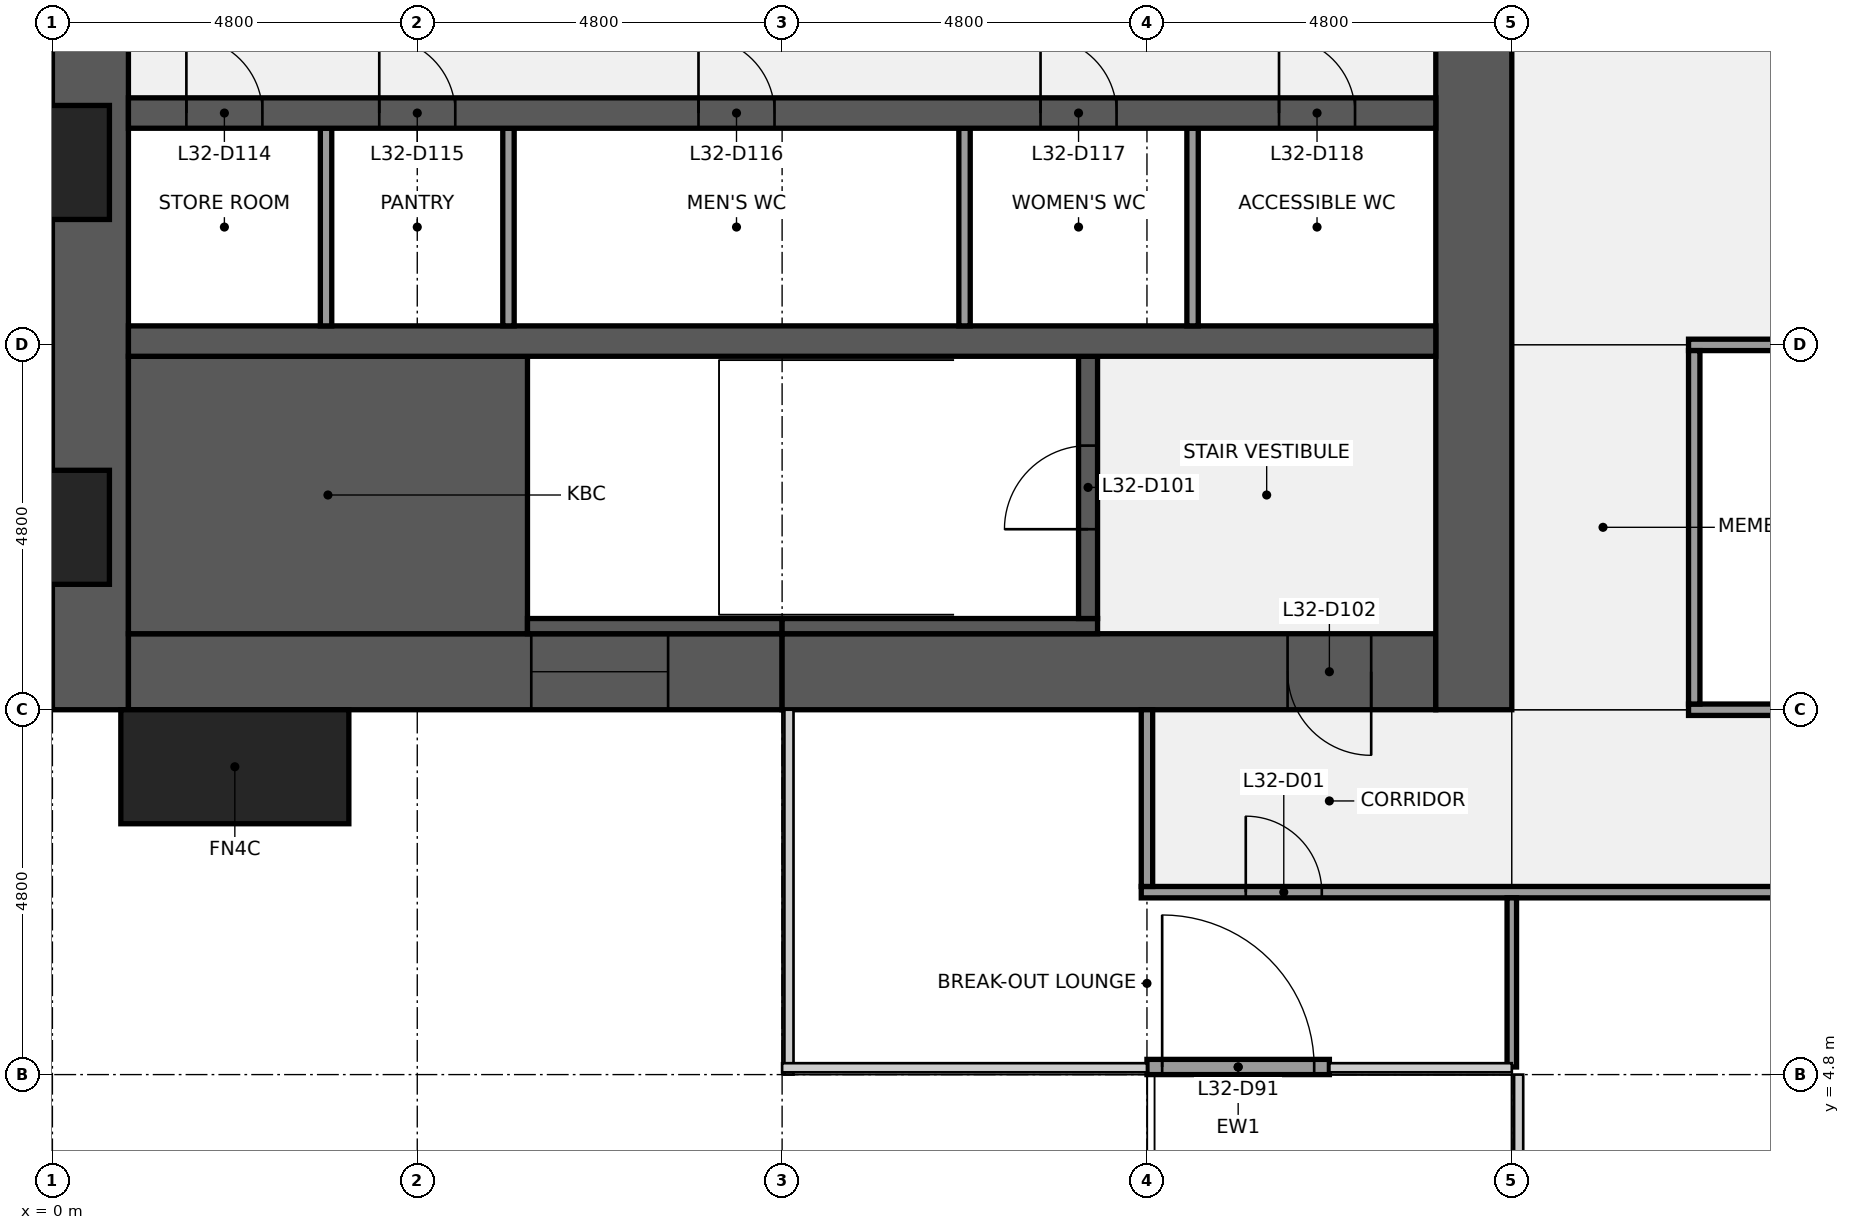
"""IFC4 building model, lengths in metres.
Left out: names, types, materials, properties, quantities, classifications, styles, units other than length and angle.
Written with IfcOpenShell. Run it as: python <this file> out.ifc"""

import sys

from ifc_helpers import new_model, si_unit, direction, frame, frame_2d, origin, origin_2d, place, context, subcontext, project, spatial, rectangle, extrude, element, fill, save


model = new_model("IFC4")
c1 = context("Model", 3, precision=1e-05, world=origin(), true_north=direction((0.0, 1.0)))
c2 = subcontext(c1, "Body", "Model", "MODEL_VIEW")
j1 = project(units=[si_unit("LENGTHUNIT", "METRE"), si_unit("PLANEANGLEUNIT", "RADIAN")], contexts=[c1])
p1 = place(None, origin())
s1 = spatial("IfcSite", under=j1, at=p1, CompositionType="ELEMENT")
p2 = place(p1, origin())
s2 = spatial("IfcBuilding", under=s1, at=p2, CompositionType="ELEMENT")
p3 = place(p2, frame((0.0, 0.0, 148.1)))
s3 = spatial("IfcBuildingStorey", under=s2, at=p3, CompositionType="ELEMENT", Elevation=148.1)
p4 = place(p3, frame((0.5, 9.6, 0.0), z_axis=(0.0, 0.0, 1.0), x_axis=(0.0, 1.0, 0.0)))
e1 = element("IfcWall", 1, at=p4, inside=s3, PredefinedType="SHEAR", context=c2, shape_type="SweptSolid", body=[
    extrude(rectangle(XDim=28.8, YDim=1.0, at=frame_2d((14.4, 0.0))), origin(), (0.0, 0.0, 1.0), 3.84),
])
p5 = place(p4, frame((8.85, 0.0, 0.9)))
e2 = element("IfcOpeningElement", 2, at=p5, cuts=e1, PredefinedType="OPENING", context=c2, shape_type="SweptSolid", body=[
    extrude(rectangle(XDim=1.5, YDim=1.5, at=frame_2d((0.75, 0.75))), frame((0.0, 0.51, 0.0), z_axis=(0.0, -1.0, 0.0), x_axis=(1.0, 0.0, 0.0)), (0.0, 0.0, 1.0), 1.02),
])
p6 = place(p4, frame((18.45, 0.0, 0.9)))
e3 = element("IfcOpeningElement", 3, at=p6, cuts=e1, PredefinedType="OPENING", context=c2, shape_type="SweptSolid", body=[
    extrude(rectangle(XDim=1.5, YDim=1.5, at=frame_2d((0.75, 0.75))), frame((0.0, 0.51, 0.0), z_axis=(0.0, -1.0, 0.0), x_axis=(1.0, 0.0, 0.0)), (0.0, 0.0, 1.0), 1.02),
])
p7 = place(p3, frame((9.6, 10.1, 0.0), z_axis=(0.0, 0.0, 1.0), x_axis=(-1.0, 0.0, 0.0)))
e4 = element("IfcWall", 4, at=p7, inside=s3, PredefinedType="SHEAR", context=c2, shape_type="SweptSolid", body=[
    extrude(rectangle(XDim=8.6, YDim=1.0, at=frame_2d((4.3, 0.0))), origin(), (0.0, 0.0, 1.0), 3.84),
])
p8 = place(p7, frame((1.5, 0.0, 0.9)))
e5 = element("IfcOpeningElement", 5, at=p8, cuts=e4, PredefinedType="OPENING", context=c2, shape_type="SweptSolid", body=[
    extrude(rectangle(XDim=1.8, YDim=1.5, at=frame_2d((0.9, 0.75))), frame((0.0, 0.51, 0.0), z_axis=(0.0, -1.0, 0.0), x_axis=(1.0, 0.0, 0.0)), (0.0, 0.0, 1.0), 1.02),
])
p9 = place(p3, frame((18.2, 10.1, 0.0), z_axis=(0.0, 0.0, 1.0), x_axis=(-1.0, 0.0, 0.0)))
e6 = element("IfcWall", 6, at=p9, inside=s3, PredefinedType="SHEAR", context=c2, shape_type="SweptSolid", body=[
    extrude(rectangle(XDim=8.6, YDim=1.0, at=frame_2d((4.3, 0.0))), origin(), (0.0, 0.0, 1.0), 3.84),
])
p10 = place(p9, frame((0.85, 0.0, 0.0)))
e7 = element("IfcOpeningElement", 7, at=p10, cuts=e6, PredefinedType="OPENING", context=c2, shape_type="SweptSolid", body=[
    extrude(rectangle(XDim=1.1, YDim=2.1, at=frame_2d((0.55, 1.05))), frame((0.0, 0.51, 0.0), z_axis=(0.0, -1.0, 0.0), x_axis=(1.0, 0.0, 0.0)), (0.0, 0.0, 1.0), 1.02),
])
p11 = place(p3, frame((18.7, 38.4, 0.0), z_axis=(0.0, 0.0, 1.0), x_axis=(0.0, -1.0, 0.0)))
e8 = element("IfcWall", 8, at=p11, inside=s3, PredefinedType="SHEAR", context=c2, shape_type="SweptSolid", body=[
    extrude(rectangle(XDim=28.8, YDim=1.0, at=frame_2d((14.4, 0.0))), origin(), (0.0, 0.0, 1.0), 3.84),
])
p12 = place(p11, frame((18.3, 0.0, 0.0)))
e9 = element("IfcOpeningElement", 9, at=p12, cuts=e8, PredefinedType="OPENING", context=c2, shape_type="SweptSolid", body=[
    extrude(rectangle(XDim=1.8, YDim=2.1, at=frame_2d((0.9, 1.05))), frame((0.0, 0.51, 0.0), z_axis=(0.0, -1.0, 0.0), x_axis=(1.0, 0.0, 0.0)), (0.0, 0.0, 1.0), 1.02),
])
p13 = place(p11, frame((8.7, 0.0, 0.0)))
e10 = element("IfcOpeningElement", 10, at=p13, cuts=e8, PredefinedType="OPENING", context=c2, shape_type="SweptSolid", body=[
    extrude(rectangle(XDim=1.8, YDim=2.1, at=frame_2d((0.9, 1.05))), frame((0.0, 0.51, 0.0), z_axis=(0.0, -1.0, 0.0), x_axis=(1.0, 0.0, 0.0)), (0.0, 0.0, 1.0), 1.02),
])
p14 = place(p3, frame((1.0, 12.425, 0.0), z_axis=(0.0, 0.0, 1.0), x_axis=(1.0, 0.0, 0.0)))
e11 = element("IfcWall", 11, at=p14, inside=s3, PredefinedType="SHEAR", context=c2, shape_type="SweptSolid", body=[
    extrude(rectangle(XDim=5.25, YDim=3.65, at=frame_2d((2.625, 0.0))), origin(), (0.0, 0.0, 1.0), 3.84),
])
p15 = place(p3, frame((6.25, 10.7, 0.0), z_axis=(0.0, 0.0, 1.0), x_axis=(1.0, 0.0, 0.0)))
e12 = element("IfcWall", 12, at=p15, inside=s3, PredefinedType="SHEAR", context=c2, shape_type="SweptSolid", body=[
    extrude(rectangle(XDim=3.35, YDim=0.2, at=frame_2d((1.675, 0.0))), origin(), (0.0, 0.0, 1.0), 3.84),
])
p16 = place(p3, frame((9.6, 10.7, 0.0), z_axis=(0.0, 0.0, 1.0), x_axis=(1.0, 0.0, 0.0)))
e13 = element("IfcWall", 13, at=p16, inside=s3, PredefinedType="SHEAR", context=c2, shape_type="SweptSolid", body=[
    extrude(rectangle(XDim=4.15, YDim=0.2, at=frame_2d((2.075, 0.0))), origin(), (0.0, 0.0, 1.0), 3.84),
])
p17 = place(p3, frame((13.625, 10.8, 0.0), z_axis=(0.0, 0.0, 1.0), x_axis=(0.0, 1.0, 0.0)))
e14 = element("IfcWall", 14, at=p17, inside=s3, PredefinedType="SHEAR", context=c2, shape_type="SweptSolid", body=[
    extrude(rectangle(XDim=3.45, YDim=0.25, at=frame_2d((1.725, 0.0))), origin(), (0.0, 0.0, 1.0), 3.84),
])
p18 = place(p17, frame((1.175, 0.0, 0.0)))
e15 = element("IfcOpeningElement", 15, at=p18, cuts=e14, PredefinedType="OPENING", context=c2, shape_type="SweptSolid", body=[
    extrude(rectangle(XDim=1.1, YDim=2.1, at=frame_2d((0.55, 1.05))), frame((0.0, 0.135, 0.0), z_axis=(0.0, -1.0, 0.0), x_axis=(1.0, 0.0, 0.0)), (0.0, 0.0, 1.0), 0.27),
])
p19 = place(p3, frame((1.0, 14.45, 0.0), z_axis=(0.0, 0.0, 1.0), x_axis=(1.0, 0.0, 0.0)))
e16 = element("IfcWall", 16, at=p19, inside=s3, PredefinedType="SHEAR", context=c2, shape_type="SweptSolid", body=[
    extrude(rectangle(XDim=17.2, YDim=0.4, at=frame_2d((8.6, 0.0))), origin(), (0.0, 0.0, 1.0), 3.84),
])
for number, where, z_axis, x_axis in (
    (17, (3.6, 14.65, 0.0), (0.0, 0.0, 1.0), (0.0, 1.0, 0.0)),
    (18, (6.0, 14.65, 0.0), (0.0, 0.0, 1.0), (0.0, 1.0, 0.0)),
    (19, (12.0, 14.65, 0.0), (0.0, 0.0, 1.0), (0.0, 1.0, 0.0)),
    (20, (15.0, 14.65, 0.0), (0.0, 0.0, 1.0), (0.0, 1.0, 0.0)),
):
    element("IfcWall", number, at=place(p3, frame(where, z_axis=z_axis, x_axis=x_axis)), inside=s3, PredefinedType="PARTITIONING", context=c2, shape_type="SweptSolid", body=[
        extrude(rectangle(XDim=2.6, YDim=0.15, at=frame_2d((1.3, 0.0))), origin(), (0.0, 0.0, 1.0), 3.84),
    ])
p20 = place(p3, frame((1.0, 17.45, 0.0), z_axis=(0.0, 0.0, 1.0), x_axis=(1.0, 0.0, 0.0)))
e21 = element("IfcWall", 21, at=p20, inside=s3, PredefinedType="SHEAR", context=c2, shape_type="SweptSolid", body=[
    extrude(rectangle(XDim=17.2, YDim=0.4, at=frame_2d((8.6, 0.0))), origin(), (0.0, 0.0, 1.0), 3.84),
])
p21 = place(p20, frame((0.762, 0.0, 0.0)))
e22 = element("IfcOpeningElement", 22, at=p21, cuts=e21, PredefinedType="OPENING", context=c2, shape_type="SweptSolid", body=[
    extrude(rectangle(XDim=1.0, YDim=2.1, at=frame_2d((0.5, 1.05))), frame((0.0, 0.21, 0.0), z_axis=(0.0, -1.0, 0.0), x_axis=(1.0, 0.0, 0.0)), (0.0, 0.0, 1.0), 0.42),
])
p22 = place(p20, frame((3.3, 0.0, 0.0)))
e23 = element("IfcOpeningElement", 23, at=p22, cuts=e21, PredefinedType="OPENING", context=c2, shape_type="SweptSolid", body=[
    extrude(rectangle(XDim=1.0, YDim=2.1, at=frame_2d((0.5, 1.05))), frame((0.0, 0.21, 0.0), z_axis=(0.0, -1.0, 0.0), x_axis=(1.0, 0.0, 0.0)), (0.0, 0.0, 1.0), 0.42),
])
p23 = place(p20, frame((7.5, 0.0, 0.0)))
e24 = element("IfcOpeningElement", 24, at=p23, cuts=e21, PredefinedType="OPENING", context=c2, shape_type="SweptSolid", body=[
    extrude(rectangle(XDim=1.0, YDim=2.1, at=frame_2d((0.5, 1.05))), frame((0.0, 0.21, 0.0), z_axis=(0.0, -1.0, 0.0), x_axis=(1.0, 0.0, 0.0)), (0.0, 0.0, 1.0), 0.42),
])
p24 = place(p20, frame((12.0, 0.0, 0.0)))
e25 = element("IfcOpeningElement", 25, at=p24, cuts=e21, PredefinedType="OPENING", context=c2, shape_type="SweptSolid", body=[
    extrude(rectangle(XDim=1.0, YDim=2.1, at=frame_2d((0.5, 1.05))), frame((0.0, 0.21, 0.0), z_axis=(0.0, -1.0, 0.0), x_axis=(1.0, 0.0, 0.0)), (0.0, 0.0, 1.0), 0.42),
])
p25 = place(p20, frame((15.137, 0.0, 0.0)))
e26 = element("IfcOpeningElement", 26, at=p25, cuts=e21, PredefinedType="OPENING", context=c2, shape_type="SweptSolid", body=[
    extrude(rectangle(XDim=1.0, YDim=2.1, at=frame_2d((0.5, 1.05))), frame((0.0, 0.21, 0.0), z_axis=(0.0, -1.0, 0.0), x_axis=(1.0, 0.0, 0.0)), (0.0, 0.0, 1.0), 0.42),
])
p26 = place(p3, frame((14.325, 7.2, 0.0), z_axis=(0.0, 0.0, 1.0), x_axis=(1.0, 0.0, 0.0)))
e27 = element("IfcWall", 27, at=p26, inside=s3, PredefinedType="PARTITIONING", context=c2, shape_type="SweptSolid", body=[
    extrude(rectangle(XDim=28.95, YDim=0.15, at=frame_2d((14.475, 0.0))), origin(), (0.0, 0.0, 1.0), 2.849),
])
p27 = place(p26, frame((1.375, 0.0, 0.0)))
e28 = element("IfcOpeningElement", 28, at=p27, cuts=e27, PredefinedType="OPENING", context=c2, shape_type="SweptSolid", body=[
    extrude(rectangle(XDim=1.0, YDim=2.1, at=frame_2d((0.5, 1.05))), frame((0.0, 0.085, 0.0), z_axis=(0.0, -1.0, 0.0), x_axis=(1.0, 0.0, 0.0)), (0.0, 0.0, 1.0), 0.17),
])
p28 = place(p26, frame((13.975, 0.0, 0.0)))
e29 = element("IfcOpeningElement", 29, at=p28, cuts=e27, PredefinedType="OPENING", context=c2, shape_type="SweptSolid", body=[
    extrude(rectangle(XDim=1.0, YDim=2.1, at=frame_2d((0.5, 1.05))), frame((0.0, 0.085, 0.0), z_axis=(0.0, -1.0, 0.0), x_axis=(1.0, 0.0, 0.0)), (0.0, 0.0, 1.0), 0.17),
])
p29 = place(p26, frame((25.975, 0.0, 0.0)))
e30 = element("IfcOpeningElement", 30, at=p29, cuts=e27, PredefinedType="OPENING", context=c2, shape_type="SweptSolid", body=[
    extrude(rectangle(XDim=1.0, YDim=2.1, at=frame_2d((0.5, 1.05))), frame((0.0, 0.085, 0.0), z_axis=(0.0, -1.0, 0.0), x_axis=(1.0, 0.0, 0.0)), (0.0, 0.0, 1.0), 0.17),
])
p30 = place(p3, frame((21.525, 9.6, 0.0), z_axis=(0.0, 0.0, 1.0), x_axis=(1.0, 0.0, 0.0)))
e31 = element("IfcWall", 31, at=p30, inside=s3, PredefinedType="PARTITIONING", context=c2, shape_type="SweptSolid", body=[
    extrude(rectangle(XDim=14.55, YDim=0.15, at=frame_2d((7.275, 0.0))), origin(), (0.0, 0.0, 1.0), 2.849),
])
p31 = place(p30, frame((2.575, 0.0, 0.0)))
e32 = element("IfcOpeningElement", 32, at=p31, cuts=e31, PredefinedType="OPENING", context=c2, shape_type="SweptSolid", body=[
    extrude(rectangle(XDim=1.0, YDim=2.1, at=frame_2d((0.5, 1.05))), frame((0.0, 0.085, 0.0), z_axis=(0.0, -1.0, 0.0), x_axis=(1.0, 0.0, 0.0)), (0.0, 0.0, 1.0), 0.17),
])
p32 = place(p30, frame((9.775, 0.0, 0.0)))
e33 = element("IfcOpeningElement", 33, at=p32, cuts=e31, PredefinedType="OPENING", context=c2, shape_type="SweptSolid", body=[
    extrude(rectangle(XDim=1.0, YDim=2.1, at=frame_2d((0.5, 1.05))), frame((0.0, 0.085, 0.0), z_axis=(0.0, -1.0, 0.0), x_axis=(1.0, 0.0, 0.0)), (0.0, 0.0, 1.0), 0.17),
])
p33 = place(p3, frame((21.525, 14.4, 0.0), z_axis=(0.0, 0.0, 1.0), x_axis=(1.0, 0.0, 0.0)))
e34 = element("IfcWall", 34, at=p33, inside=s3, PredefinedType="PARTITIONING", context=c2, shape_type="SweptSolid", body=[
    extrude(rectangle(XDim=2.55, YDim=0.15, at=frame_2d((1.275, 0.0))), origin(), (0.0, 0.0, 1.0), 2.849),
])
p34 = place(p3, frame((14.4, 7.275, 0.0), z_axis=(0.0, 0.0, 1.0), x_axis=(0.0, 1.0, 0.0)))
e35 = element("IfcWall", 35, at=p34, inside=s3, PredefinedType="PARTITIONING", context=c2, shape_type="SweptSolid", body=[
    extrude(rectangle(XDim=2.325, YDim=0.15, at=frame_2d((1.163, 0.0))), origin(), (0.0, 0.0, 1.0), 2.849),
])
p35 = place(p3, frame((19.2, 4.9, 0.0), z_axis=(0.0, 0.0, 1.0), x_axis=(0.0, 1.0, 0.0)))
e36 = element("IfcWall", 36, at=p35, inside=s3, PredefinedType="PARTITIONING", context=c2, shape_type="SweptSolid", body=[
    extrude(rectangle(XDim=2.225, YDim=0.125, at=frame_2d((1.113, 0.0))), origin(), (0.0, 0.0, 1.0), 2.849),
])
p36 = place(p3, frame((21.6, 9.675, 0.0), z_axis=(0.0, 0.0, 1.0), x_axis=(0.0, 1.0, 0.0)))
e37 = element("IfcWall", 37, at=p36, inside=s3, PredefinedType="PARTITIONING", context=c2, shape_type="SweptSolid", body=[
    extrude(rectangle(XDim=4.65, YDim=0.15, at=frame_2d((2.325, 0.0))), origin(), (0.0, 0.0, 1.0), 2.849),
])
p37 = place(p3, frame((2.4, 8.85, 0.0), z_axis=(0.0, 0.0, 1.0), x_axis=(1.0, 0.0, 0.0)))
e38 = element("IfcColumn", 38, at=p37, inside=s3, PredefinedType="PILASTER", context=c2, shape_type="SweptSolid", body=[
    extrude(rectangle(XDim=3.0, YDim=1.5, at=origin_2d()), origin(), (0.0, 0.0, 1.0), 4.0),
])
p38 = place(p3, frame((14.4, 4.9, 0.0), z_axis=(0.0, 0.0, 1.0), x_axis=(1.0, 0.0, 0.0)))
e39 = element("IfcWall", 39, at=p38, inside=s3, PredefinedType="SOLIDWALL", context=c2, shape_type="SweptSolid", body=[
    extrude(rectangle(XDim=2.4, YDim=0.2, at=frame_2d((1.2, 0.0))), origin(), (0.0, 0.0, 1.0), 3.84),
])
p39 = place(p38, frame((0.2, 0.0, 0.0)))
e40 = element("IfcOpeningElement", 40, at=p39, cuts=e39, PredefinedType="OPENING", context=c2, shape_type="SweptSolid", body=[
    extrude(rectangle(XDim=2.0, YDim=2.1, at=frame_2d((1.0, 1.05))), frame((0.0, 0.11, 0.0), z_axis=(0.0, -1.0, 0.0), x_axis=(1.0, 0.0, 0.0)), (0.0, 0.0, 1.0), 0.22),
])
p40 = place(p18, origin())
e41 = element("IfcDoor", 41, at=p40, inside=s3, OperationType="SINGLE_SWING_LEFT", PredefinedType="DOOR", context=c2, shape_type="SweptSolid", body=[
    extrude(rectangle(XDim=1.1, YDim=2.1, at=frame_2d((0.55, 1.05))), frame((0.0, 0.025, 0.0), z_axis=(0.0, -1.0, 0.0), x_axis=(1.0, 0.0, 0.0)), (0.0, 0.0, 1.0), 0.05),
])
fill(e15, e41)
p41 = place(p10, origin())
e42 = element("IfcDoor", 42, at=p41, inside=s3, OperationType="SINGLE_SWING_LEFT", PredefinedType="DOOR", context=c2, shape_type="SweptSolid", body=[
    extrude(rectangle(XDim=1.1, YDim=2.1, at=frame_2d((0.55, 1.05))), frame((0.0, 0.025, 0.0), z_axis=(0.0, -1.0, 0.0), x_axis=(1.0, 0.0, 0.0)), (0.0, 0.0, 1.0), 0.05),
])
fill(e7, e42)
p42 = place(p21, origin())
e43 = element("IfcDoor", 43, at=p42, inside=s3, OperationType="SINGLE_SWING_LEFT", PredefinedType="DOOR", context=c2, shape_type="SweptSolid", body=[
    extrude(rectangle(XDim=1.0, YDim=2.1, at=frame_2d((0.5, 1.05))), frame((0.0, 0.025, 0.0), z_axis=(0.0, -1.0, 0.0), x_axis=(1.0, 0.0, 0.0)), (0.0, 0.0, 1.0), 0.05),
])
fill(e22, e43)
p43 = place(p22, origin())
e44 = element("IfcDoor", 44, at=p43, inside=s3, OperationType="SINGLE_SWING_LEFT", PredefinedType="DOOR", context=c2, shape_type="SweptSolid", body=[
    extrude(rectangle(XDim=1.0, YDim=2.1, at=frame_2d((0.5, 1.05))), frame((0.0, 0.025, 0.0), z_axis=(0.0, -1.0, 0.0), x_axis=(1.0, 0.0, 0.0)), (0.0, 0.0, 1.0), 0.05),
])
fill(e23, e44)
p44 = place(p23, origin())
e45 = element("IfcDoor", 45, at=p44, inside=s3, OperationType="SINGLE_SWING_LEFT", PredefinedType="DOOR", context=c2, shape_type="SweptSolid", body=[
    extrude(rectangle(XDim=1.0, YDim=2.1, at=frame_2d((0.5, 1.05))), frame((0.0, 0.025, 0.0), z_axis=(0.0, -1.0, 0.0), x_axis=(1.0, 0.0, 0.0)), (0.0, 0.0, 1.0), 0.05),
])
fill(e24, e45)
p45 = place(p24, origin())
e46 = element("IfcDoor", 46, at=p45, inside=s3, OperationType="SINGLE_SWING_LEFT", PredefinedType="DOOR", context=c2, shape_type="SweptSolid", body=[
    extrude(rectangle(XDim=1.0, YDim=2.1, at=frame_2d((0.5, 1.05))), frame((0.0, 0.025, 0.0), z_axis=(0.0, -1.0, 0.0), x_axis=(1.0, 0.0, 0.0)), (0.0, 0.0, 1.0), 0.05),
])
fill(e25, e46)
p46 = place(p25, origin())
e47 = element("IfcDoor", 47, at=p46, inside=s3, OperationType="SINGLE_SWING_LEFT", PredefinedType="DOOR", context=c2, shape_type="SweptSolid", body=[
    extrude(rectangle(XDim=1.0, YDim=2.1, at=frame_2d((0.5, 1.05))), frame((0.0, 0.025, 0.0), z_axis=(0.0, -1.0, 0.0), x_axis=(1.0, 0.0, 0.0)), (0.0, 0.0, 1.0), 0.05),
])
fill(e26, e47)
p47 = place(p8, origin())
e48 = element("IfcWindow", 48, at=p47, inside=s3, PartitioningType="SINGLE_PANEL", PredefinedType="WINDOW", context=c2, shape_type="SweptSolid", body=[
    extrude(rectangle(XDim=1.8, YDim=1.5, at=frame_2d((0.9, 0.75))), frame((0.0, 0.03, 0.0), z_axis=(0.0, -1.0, 0.0), x_axis=(1.0, 0.0, 0.0)), (0.0, 0.0, 1.0), 0.06),
])
fill(e5, e48)
p48 = place(p27, origin())
e49 = element("IfcDoor", 49, at=p48, inside=s3, OperationType="SINGLE_SWING_LEFT", PredefinedType="DOOR", context=c2, shape_type="SweptSolid", body=[
    extrude(rectangle(XDim=1.0, YDim=2.1, at=frame_2d((0.5, 1.05))), frame((0.0, 0.025, 0.0), z_axis=(0.0, -1.0, 0.0), x_axis=(1.0, 0.0, 0.0)), (0.0, 0.0, 1.0), 0.05),
])
fill(e28, e49)
p49 = place(p39, origin())
e50 = element("IfcDoor", 50, at=p49, inside=s3, OperationType="SINGLE_SWING_LEFT", PredefinedType="DOOR", context=c2, shape_type="SweptSolid", body=[
    extrude(rectangle(XDim=2.0, YDim=2.1, at=frame_2d((1.0, 1.05))), frame((0.0, 0.025, 0.0), z_axis=(0.0, -1.0, 0.0), x_axis=(1.0, 0.0, 0.0)), (0.0, 0.0, 1.0), 0.05),
])
fill(e40, e50)
save(model, sys.argv[1])
